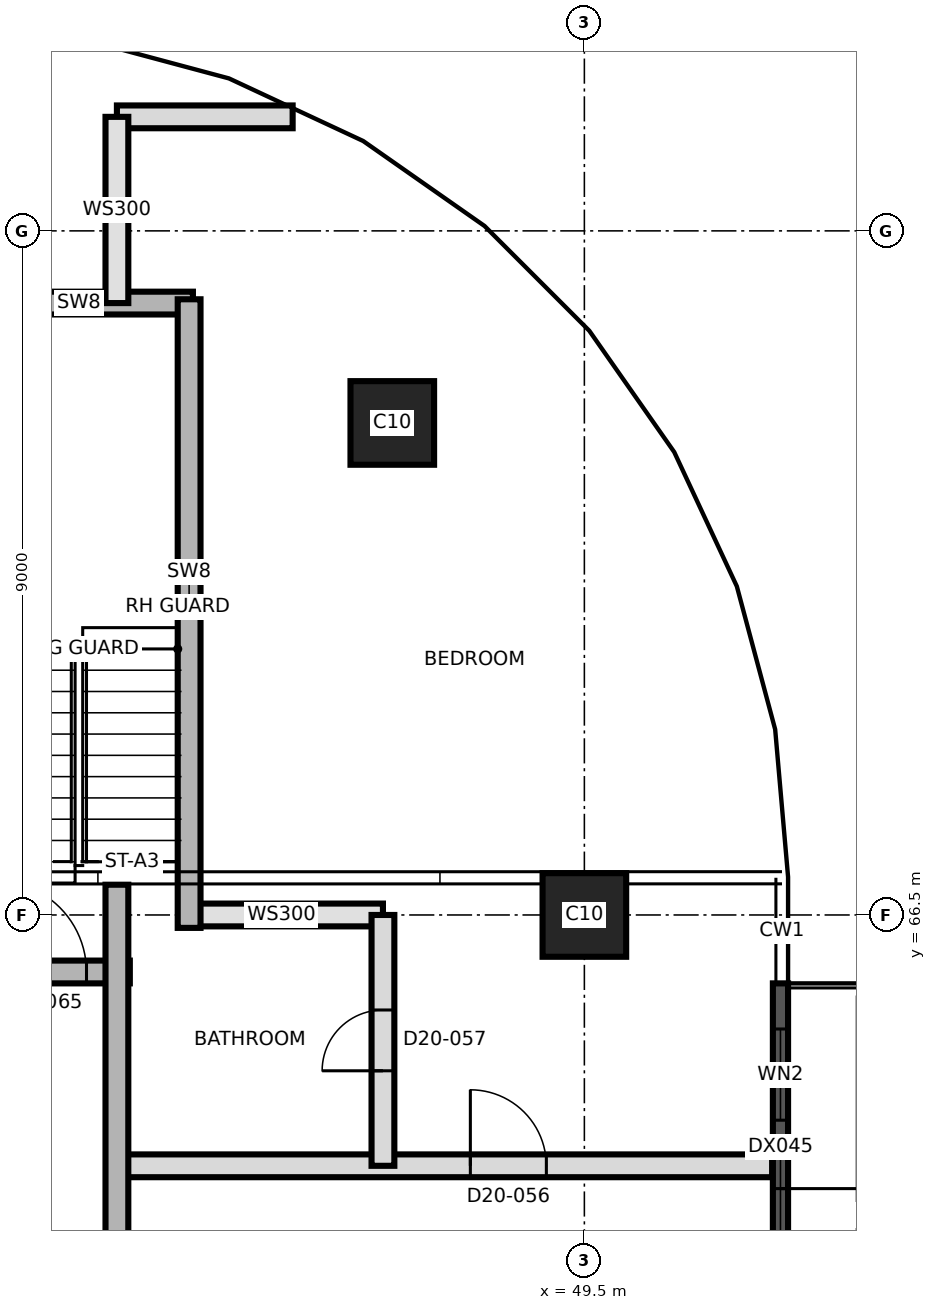
"""IFC4 building model, lengths in metres.
Left out: names, types, materials, properties, quantities, classifications, styles, units other than length and angle.
Written with IfcOpenShell. Run it as: python <this file> out.ifc"""

import sys

from ifc_helpers import new_model, si_unit, direction, frame, frame_2d, origin, origin_2d, place, context, subcontext, project, spatial, rectangle, extrude, element, fill, save


model = new_model("IFC4")
c1 = context("Model", 3, precision=1e-05, world=origin(), true_north=direction((0.0, 1.0)))
c2 = subcontext(c1, "Body", "Model", "MODEL_VIEW")
j1 = project(units=[si_unit("LENGTHUNIT", "METRE"), si_unit("PLANEANGLEUNIT", "RADIAN")], contexts=[c1])
p1 = place(None, origin())
s1 = spatial("IfcSite", under=j1, at=p1, CompositionType="ELEMENT")
p2 = place(p1, origin())
s2 = spatial("IfcBuilding", under=s1, at=p2, CompositionType="ELEMENT")
p3 = place(p2, frame((0.0, 0.0, 182.9)))
s3 = spatial("IfcBuildingStorey", under=s2, at=p3, CompositionType="ELEMENT", Elevation=182.9)
for number, where, z_axis, x_axis in (
    (1, (49.5, 66.5, 0.0), (0.0, 0.0, 1.0), (1.0, 0.0, 0.0)),
    (2, (46.973, 72.973, 0.0), (0.0, 0.0, 1.0), (1.0, 0.0, 0.0)),
):
    element("IfcColumn", number, at=place(p3, frame(where, z_axis=z_axis, x_axis=x_axis)), inside=s3, PredefinedType="COLUMN", context=c2, shape_type="SweptSolid", body=[
        extrude(rectangle(XDim=1.1, YDim=1.1, at=origin_2d()), origin(), (0.0, 0.0, 1.0), 3.7),
    ])
p4 = place(p3, frame((52.08, 65.6, 0.0), z_axis=(0.0, 0.0, 1.0), x_axis=(0.0, -1.0, 0.0)))
e3 = element("IfcWall", 3, at=p4, inside=s3, PredefinedType="SOLIDWALL", context=c2, shape_type="SweptSolid", body=[
    extrude(rectangle(XDim=7.2, YDim=0.2, at=frame_2d((3.6, 0.0))), origin(), (0.0, 0.0, 1.0), 3.4),
])
p5 = place(p4, frame((2.7, 0.0, 0.0)))
e4 = element("IfcOpeningElement", 4, at=p5, cuts=e3, PredefinedType="OPENING", context=c2, shape_type="SweptSolid", body=[
    extrude(rectangle(XDim=1.8, YDim=2.4, at=frame_2d((0.9, 1.2))), frame((0.0, 0.11, 0.0), z_axis=(0.0, -1.0, 0.0), x_axis=(1.0, 0.0, 0.0)), (0.0, 0.0, 1.0), 0.22),
])
p6 = place(p4, frame((5.4, 0.0, 0.9)))
e5 = element("IfcOpeningElement", 5, at=p6, cuts=e3, PredefinedType="OPENING", context=c2, shape_type="SweptSolid", body=[
    extrude(rectangle(XDim=1.2, YDim=2.1, at=frame_2d((0.6, 1.05))), frame((0.0, 0.11, 0.0), z_axis=(0.0, -1.0, 0.0), x_axis=(1.0, 0.0, 0.0)), (0.0, 0.0, 1.0), 0.22),
])
p7 = place(p4, frame((0.6, 0.0, 0.9)))
e6 = element("IfcOpeningElement", 6, at=p7, cuts=e3, PredefinedType="OPENING", context=c2, shape_type="SweptSolid", body=[
    extrude(rectangle(XDim=1.2, YDim=2.1, at=frame_2d((0.6, 1.05))), frame((0.0, 0.11, 0.0), z_axis=(0.0, -1.0, 0.0), x_axis=(1.0, 0.0, 0.0)), (0.0, 0.0, 1.0), 0.22),
])
p8 = place(p3, frame((43.35, 63.2, 0.0), z_axis=(0.0, 0.0, 1.0), x_axis=(1.0, 0.0, 0.0)))
e7 = element("IfcWall", 7, at=p8, inside=s3, PredefinedType="PARTITIONING", context=c2, shape_type="SweptSolid", body=[
    extrude(rectangle(XDim=8.62, YDim=0.3, at=frame_2d((4.31, 0.0))), origin(), (0.0, 0.0, 1.0), 3.4),
])
p9 = place(p8, frame((4.65, 0.0, 0.0)))
e8 = element("IfcOpeningElement", 8, at=p9, cuts=e7, PredefinedType="OPENING", context=c2, shape_type="SweptSolid", body=[
    extrude(rectangle(XDim=1.0, YDim=2.1, at=frame_2d((0.5, 1.05))), frame((0.0, 0.16, 0.0), z_axis=(0.0, -1.0, 0.0), x_axis=(1.0, 0.0, 0.0)), (0.0, 0.0, 1.0), 0.32),
])
p10 = place(p3, frame((40.65, 65.75, 0.0), z_axis=(0.0, 0.0, 1.0), x_axis=(1.0, 0.0, 0.0)))
e9 = element("IfcWall", 9, at=p10, inside=s3, PredefinedType="SHEAR", context=c2, shape_type="SweptSolid", body=[
    extrude(rectangle(XDim=2.87, YDim=0.3, at=frame_2d((1.435, 0.0))), origin(), (0.0, 0.0, 1.0), 3.4),
])
p11 = place(p10, frame((1.1, 0.0, 0.0)))
e10 = element("IfcOpeningElement", 10, at=p11, cuts=e9, PredefinedType="OPENING", context=c2, shape_type="SweptSolid", body=[
    extrude(rectangle(XDim=1.2, YDim=2.1, at=frame_2d((0.6, 1.05))), frame((0.0, 0.16, 0.0), z_axis=(0.0, -1.0, 0.0), x_axis=(1.0, 0.0, 0.0)), (0.0, 0.0, 1.0), 0.32),
])
p12 = place(p3, frame((44.18, 66.5, 0.0), z_axis=(0.0, 0.0, 1.0), x_axis=(1.0, 0.0, 0.0)))
e11 = element("IfcWall", 11, at=p12, inside=s3, PredefinedType="SOLIDWALL", context=c2, shape_type="SweptSolid", body=[
    extrude(rectangle(XDim=2.67, YDim=0.3, at=frame_2d((1.335, 0.0))), origin(), (0.0, 0.0, 1.0), 3.4),
])
p13 = place(p3, frame((41.35, 74.55, 0.0), z_axis=(0.0, 0.0, 1.0), x_axis=(1.0, 0.0, 0.0)))
e12 = element("IfcWall", 12, at=p13, inside=s3, PredefinedType="SHEAR", context=c2, shape_type="SweptSolid", body=[
    extrude(rectangle(XDim=3.0, YDim=0.3, at=frame_2d((1.5, 0.0))), origin(), (0.0, 0.0, 1.0), 3.4),
])
p14 = place(p3, frame((43.35, 77.0, 0.0), z_axis=(0.0, 0.0, 1.0), x_axis=(1.0, 0.0, 0.0)))
e13 = element("IfcWall", 13, at=p14, inside=s3, PredefinedType="PARTITIONING", context=c2, shape_type="SweptSolid", body=[
    extrude(rectangle(XDim=2.312, YDim=0.3, at=frame_2d((1.156, 0.0))), origin(), (0.0, 0.0, 1.0), 3.4),
])
p15 = place(p3, frame((43.35, 39.65, 0.0), z_axis=(0.0, 0.0, 1.0), x_axis=(0.0, 1.0, 0.0)))
e14 = element("IfcWall", 14, at=p15, inside=s3, PredefinedType="SHEAR", context=c2, shape_type="SweptSolid", body=[
    extrude(rectangle(XDim=27.248, YDim=0.3, at=frame_2d((13.624, 0.0))), origin(), (0.0, 0.0, 1.0), 3.4),
])
p16 = place(p15, frame((1.0, 0.0, 0.0)))
e15 = element("IfcOpeningElement", 15, at=p16, cuts=e14, PredefinedType="OPENING", context=c2, shape_type="SweptSolid", body=[
    extrude(rectangle(XDim=1.0, YDim=2.1, at=frame_2d((0.5, 1.05))), frame((0.0, 0.16, 0.0), z_axis=(0.0, -1.0, 0.0), x_axis=(1.0, 0.0, 0.0)), (0.0, 0.0, 1.0), 0.32),
])
p17 = place(p15, frame((6.85, 0.0, 0.0)))
e16 = element("IfcOpeningElement", 16, at=p17, cuts=e14, PredefinedType="OPENING", context=c2, shape_type="SweptSolid", body=[
    extrude(rectangle(XDim=1.0, YDim=2.1, at=frame_2d((0.5, 1.05))), frame((0.0, 0.16, 0.0), z_axis=(0.0, -1.0, 0.0), x_axis=(1.0, 0.0, 0.0)), (0.0, 0.0, 1.0), 0.32),
])
p18 = place(p15, frame((12.85, 0.0, 0.0)))
e17 = element("IfcOpeningElement", 17, at=p18, cuts=e14, PredefinedType="OPENING", context=c2, shape_type="SweptSolid", body=[
    extrude(rectangle(XDim=1.0, YDim=2.1, at=frame_2d((0.5, 1.05))), frame((0.0, 0.16, 0.0), z_axis=(0.0, -1.0, 0.0), x_axis=(1.0, 0.0, 0.0)), (0.0, 0.0, 1.0), 0.32),
])
p19 = place(p15, frame((19.85, 0.0, 0.0)))
e18 = element("IfcOpeningElement", 18, at=p19, cuts=e14, PredefinedType="OPENING", context=c2, shape_type="SweptSolid", body=[
    extrude(rectangle(XDim=1.0, YDim=2.1, at=frame_2d((0.5, 1.05))), frame((0.0, 0.16, 0.0), z_axis=(0.0, -1.0, 0.0), x_axis=(1.0, 0.0, 0.0)), (0.0, 0.0, 1.0), 0.32),
])
p20 = place(p3, frame((43.35, 74.55, 0.0), z_axis=(0.0, 0.0, 1.0), x_axis=(0.0, 1.0, 0.0)))
e19 = element("IfcWall", 19, at=p20, inside=s3, PredefinedType="SOLIDWALL", context=c2, shape_type="SweptSolid", body=[
    extrude(rectangle(XDim=2.45, YDim=0.3, at=frame_2d((1.225, 0.0))), origin(), (0.0, 0.0, 1.0), 3.4),
])
p21 = place(p3, frame((44.3, 66.33, 0.0), z_axis=(0.0, 0.0, 1.0), x_axis=(0.0, 1.0, 0.0)))
e20 = element("IfcWall", 20, at=p21, inside=s3, PredefinedType="SHEAR", context=c2, shape_type="SweptSolid", body=[
    extrude(rectangle(XDim=8.27, YDim=0.3, at=frame_2d((4.135, 0.0))), origin(), (0.0, 0.0, 1.0), 3.4),
])
p22 = place(p3, frame((46.85, 63.2, 0.0), z_axis=(0.0, 0.0, 1.0), x_axis=(0.0, 1.0, 0.0)))
e21 = element("IfcWall", 21, at=p22, inside=s3, PredefinedType="PARTITIONING", context=c2, shape_type="SweptSolid", body=[
    extrude(rectangle(XDim=3.3, YDim=0.3, at=frame_2d((1.65, 0.0))), origin(), (0.0, 0.0, 1.0), 3.4),
])
p23 = place(p22, frame((1.25, 0.0, 0.0)))
e22 = element("IfcOpeningElement", 22, at=p23, cuts=e21, PredefinedType="OPENING", context=c2, shape_type="SweptSolid", body=[
    extrude(rectangle(XDim=0.8, YDim=2.1, at=frame_2d((0.4, 1.05))), frame((0.0, 0.16, 0.0), z_axis=(0.0, -1.0, 0.0), x_axis=(1.0, 0.0, 0.0)), (0.0, 0.0, 1.0), 0.32),
])
p24 = place(p5, origin())
e23 = element("IfcDoor", 23, at=p24, inside=s3, OperationType="SINGLE_SWING_LEFT", PredefinedType="DOOR", context=c2, shape_type="SweptSolid", body=[
    extrude(rectangle(XDim=1.8, YDim=2.4, at=frame_2d((0.9, 1.2))), frame((0.0, 0.025, 0.0), z_axis=(0.0, -1.0, 0.0), x_axis=(1.0, 0.0, 0.0)), (0.0, 0.0, 1.0), 0.05),
])
fill(e4, e23)
p25 = place(p7, origin())
e24 = element("IfcWindow", 24, at=p25, inside=s3, PartitioningType="SINGLE_PANEL", PredefinedType="WINDOW", context=c2, shape_type="SweptSolid", body=[
    extrude(rectangle(XDim=1.2, YDim=2.1, at=frame_2d((0.6, 1.05))), frame((0.0, 0.03, 0.0), z_axis=(0.0, -1.0, 0.0), x_axis=(1.0, 0.0, 0.0)), (0.0, 0.0, 1.0), 0.06),
])
fill(e6, e24)
p26 = place(p9, origin())
e25 = element("IfcDoor", 25, at=p26, inside=s3, OperationType="SINGLE_SWING_RIGHT", PredefinedType="DOOR", context=c2, shape_type="SweptSolid", body=[
    extrude(rectangle(XDim=1.0, YDim=2.1, at=frame_2d((0.5, 1.05))), frame((0.0, 0.025, 0.0), z_axis=(0.0, -1.0, 0.0), x_axis=(1.0, 0.0, 0.0)), (0.0, 0.0, 1.0), 0.05),
])
fill(e8, e25)
p27 = place(p23, origin())
e26 = element("IfcDoor", 26, at=p27, inside=s3, OperationType="SINGLE_SWING_LEFT", PredefinedType="DOOR", context=c2, shape_type="SweptSolid", body=[
    extrude(rectangle(XDim=0.8, YDim=2.1, at=frame_2d((0.4, 1.05))), frame((0.0, 0.025, 0.0), z_axis=(0.0, -1.0, 0.0), x_axis=(1.0, 0.0, 0.0)), (0.0, 0.0, 1.0), 0.05),
])
fill(e22, e26)
p28 = place(p11, origin())
e27 = element("IfcDoor", 27, at=p28, inside=s3, OperationType="SINGLE_SWING_RIGHT", PredefinedType="DOOR", context=c2, shape_type="SweptSolid", body=[
    extrude(rectangle(XDim=1.2, YDim=2.1, at=frame_2d((0.6, 1.05))), frame((0.0, 0.025, 0.0), z_axis=(0.0, -1.0, 0.0), x_axis=(1.0, 0.0, 0.0)), (0.0, 0.0, 1.0), 0.05),
])
fill(e10, e27)
save(model, sys.argv[1])
